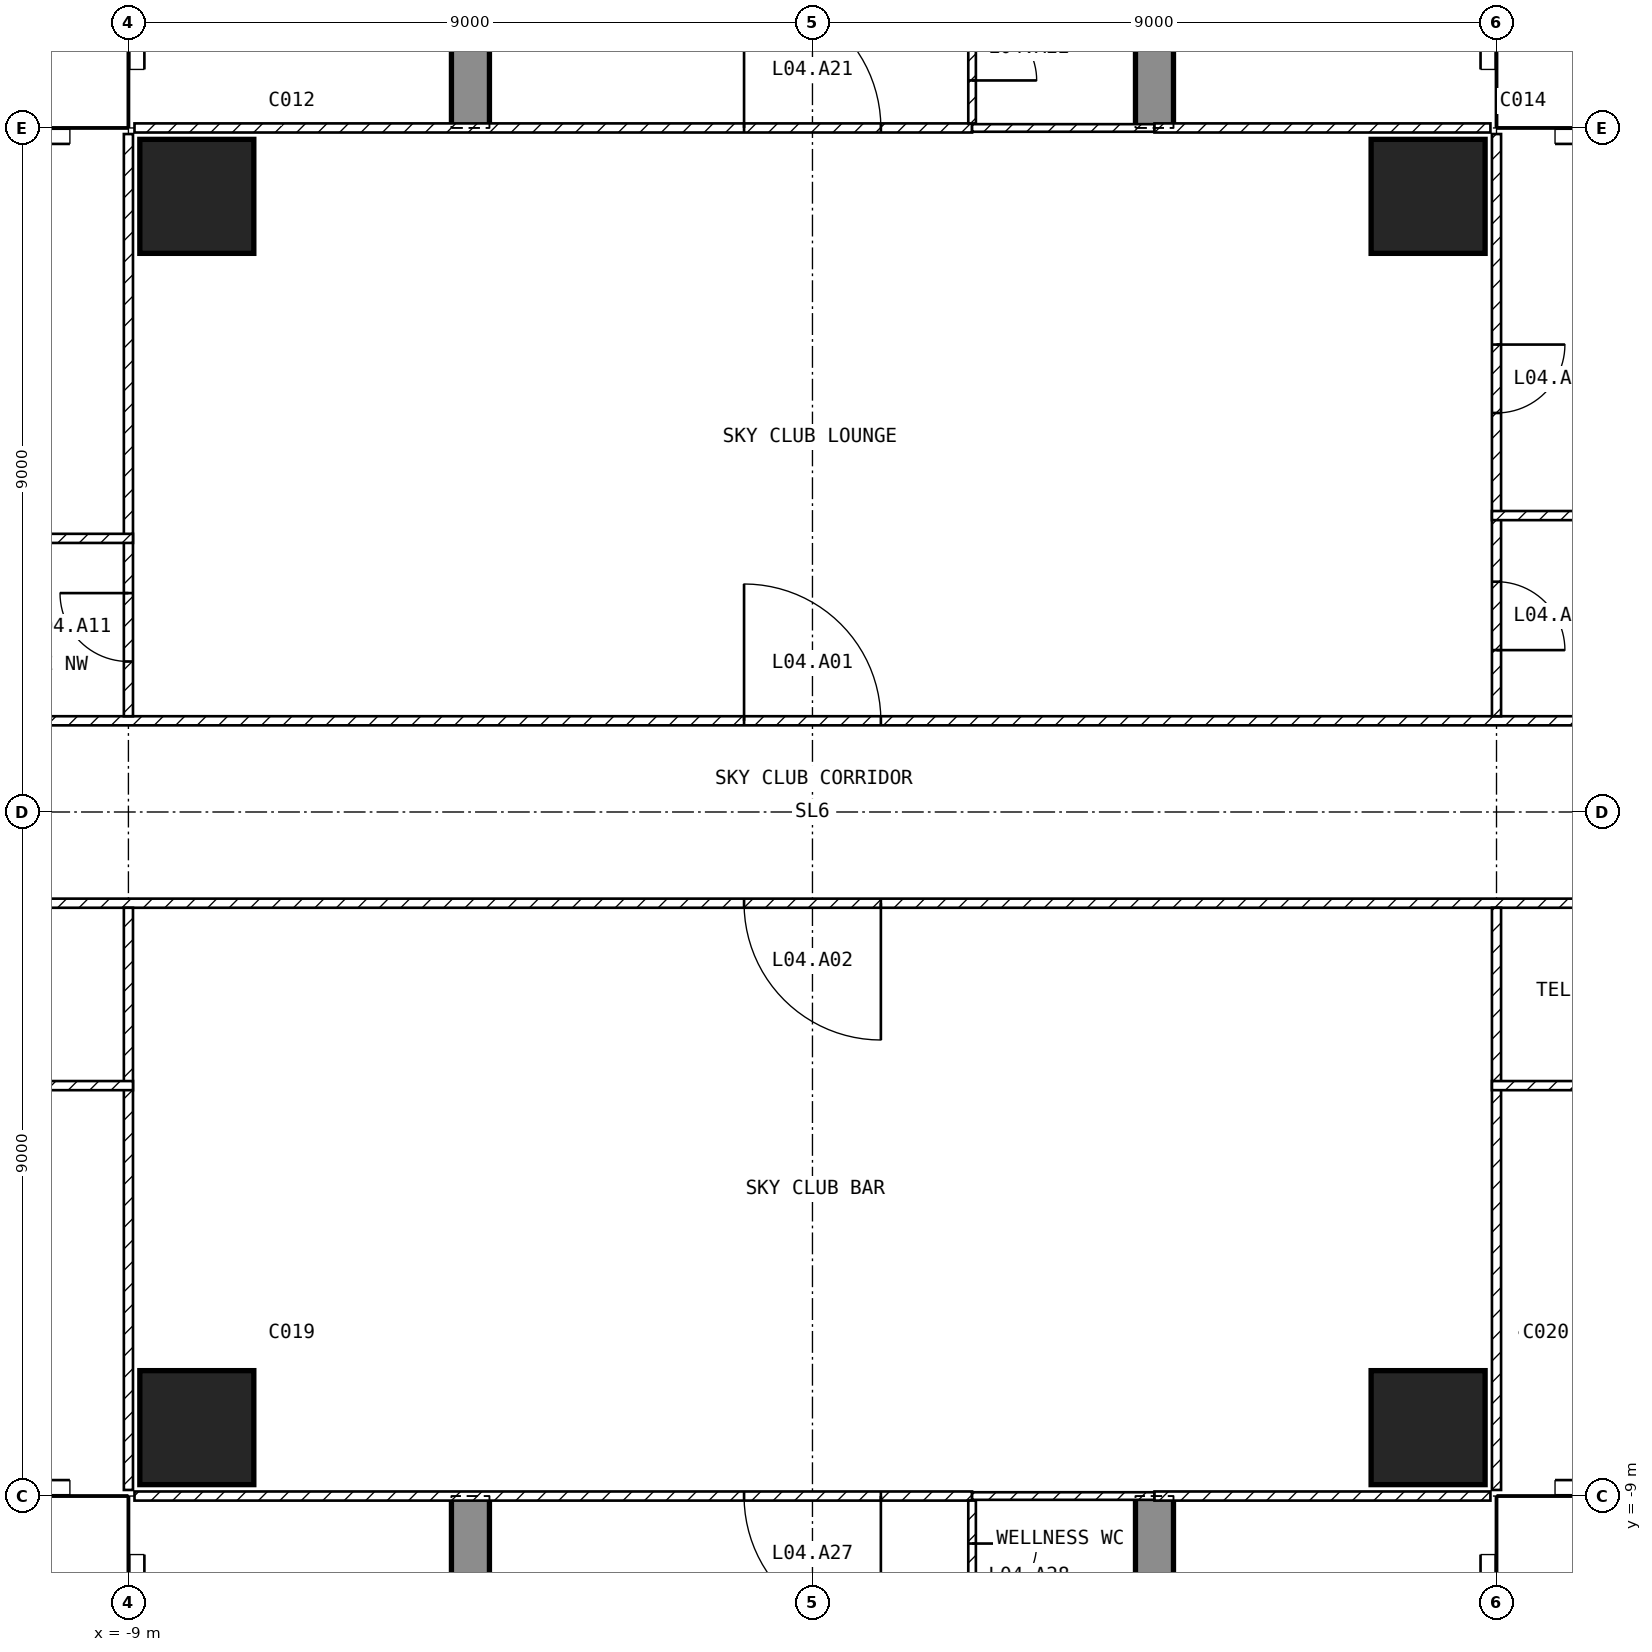
"""IFC4 building model, lengths in metres.
Left out: names, types, materials, properties, quantities, classifications, styles, units other than length and angle.
Written with IfcOpenShell. Run it as: python <this file> out.ifc"""

import sys

from ifc_helpers import new_model, si_unit, direction, frame, frame_2d, origin, origin_2d, place, context, subcontext, project, spatial, polyline, rectangle, outline, extrude, element, fill, save


model = new_model("IFC4")
c1 = context("Model", 3, precision=1e-05, world=origin(), true_north=direction((0.0, 1.0)))
c2 = subcontext(c1, "Body", "Model", "MODEL_VIEW")
j1 = project(units=[si_unit("LENGTHUNIT", "METRE"), si_unit("PLANEANGLEUNIT", "RADIAN")], contexts=[c1])
p1 = place(None, origin())
s1 = spatial("IfcSite", under=j1, at=p1, CompositionType="ELEMENT")
p2 = place(p1, origin())
s2 = spatial("IfcBuilding", under=s1, at=p2, CompositionType="ELEMENT")
p3 = place(p2, frame((0.0, 0.0, 32.0)))
s3 = spatial("IfcBuildingStorey", under=s2, at=p3, CompositionType="ELEMENT", Elevation=32.0)
for number, where, z_axis, x_axis in (
    (1, (-8.1, -8.1, -0.3), (0.0, 0.0, 1.0), (1.0, 0.0, 0.0)),
    (2, (-8.1, 8.1, -0.3), (0.0, 0.0, 1.0), (1.0, 0.0, 0.0)),
    (3, (8.1, -8.1, -0.3), (0.0, 0.0, 1.0), (1.0, 0.0, 0.0)),
    (4, (8.1, 8.1, -0.3), (0.0, 0.0, 1.0), (1.0, 0.0, 0.0)),
):
    element("IfcColumn", number, at=place(p3, frame(where, z_axis=z_axis, x_axis=x_axis)), inside=s3, PredefinedType="COLUMN", context=c2, shape_type="SweptSolid", body=[
        extrude(rectangle(XDim=1.5, YDim=1.5, at=origin_2d()), origin(), (0.0, 0.0, 1.0), 4.55),
    ])
p4 = place(p3, frame((-4.75, -25.35, -0.3), z_axis=(1.0, 0.0, 0.0), x_axis=(0.0, 1.0, 0.0)))
e5 = element("IfcWall", 5, at=p4, inside=s3, PredefinedType="SHEAR", context=c2, shape_type="SweptSolid", body=[
    extrude(outline(polyline([(0.0, 0.0), (4.05, 0.0), (4.05, 2.7), (6.45, 2.7), (6.45, 0.0), (11.85, 0.0), (11.85, 2.7), (14.25, 2.7), (14.25, 0.0), (16.35, 0.0), (16.35, 4.55), (0.0, 4.55), (0.0, 0.0)])), origin(), (0.0, 0.0, 1.0), 0.5),
])
p5 = place(p3, frame((-4.75, 9.0, -0.3), z_axis=(1.0, 0.0, 0.0), x_axis=(0.0, 1.0, 0.0)))
e6 = element("IfcWall", 6, at=p5, inside=s3, PredefinedType="SHEAR", context=c2, shape_type="SweptSolid", body=[
    extrude(outline(polyline([(0.0, 0.0), (2.1, 0.0), (2.1, 2.7), (4.5, 2.7), (4.5, 0.0), (9.9, 0.0), (9.9, 2.7), (12.3, 2.7), (12.3, 0.0), (16.35, 0.0), (16.35, 4.55), (0.0, 4.55), (0.0, 0.0)])), origin(), (0.0, 0.0, 1.0), 0.5),
])
p6 = place(p3, frame((4.25, -25.35, -0.3), z_axis=(1.0, 0.0, 0.0), x_axis=(0.0, 1.0, 0.0)))
e7 = element("IfcWall", 7, at=p6, inside=s3, PredefinedType="SHEAR", context=c2, shape_type="SweptSolid", body=[
    extrude(outline(polyline([(0.0, 0.0), (4.05, 0.0), (4.05, 2.7), (6.45, 2.7), (6.45, 0.0), (11.85, 0.0), (11.85, 2.7), (14.25, 2.7), (14.25, 0.0), (16.35, 0.0), (16.35, 4.55), (0.0, 4.55), (0.0, 0.0)])), origin(), (0.0, 0.0, 1.0), 0.5),
])
p7 = place(p3, frame((4.25, 9.0, -0.3), z_axis=(1.0, 0.0, 0.0), x_axis=(0.0, 1.0, 0.0)))
e8 = element("IfcWall", 8, at=p7, inside=s3, PredefinedType="SHEAR", context=c2, shape_type="SweptSolid", body=[
    extrude(outline(polyline([(0.0, 0.0), (2.1, 0.0), (2.1, 2.7), (4.5, 2.7), (4.5, 0.0), (9.9, 0.0), (9.9, 2.7), (12.3, 2.7), (12.3, 0.0), (16.35, 0.0), (16.35, 4.55), (0.0, 4.55), (0.0, 0.0)])), origin(), (0.0, 0.0, 1.0), 0.5),
])
p8 = place(p3, frame((-12.6, 1.2, 0.0), z_axis=(0.0, 0.0, 1.0), x_axis=(1.0, 0.0, 0.0)))
e9 = element("IfcWall", 9, at=p8, inside=s3, PredefinedType="PARTITIONING", context=c2, shape_type="SweptSolid", body=[
    extrude(rectangle(XDim=30.6, YDim=0.12, at=frame_2d((15.3, 0.0))), origin(), (0.0, 0.0, 1.0), 4.25),
])
p9 = place(p8, frame((11.7, 0.0, 0.0)))
e10 = element("IfcOpeningElement", 10, at=p9, cuts=e9, PredefinedType="OPENING", context=c2, shape_type="SweptSolid", body=[
    extrude(rectangle(XDim=1.8, YDim=2.1, at=frame_2d((0.9, 1.05))), frame((0.0, 0.07, 0.0), z_axis=(0.0, -1.0, 0.0), x_axis=(1.0, 0.0, 0.0)), (0.0, 0.0, 1.0), 0.14),
])
p10 = place(p8, frame((28.35, 0.0, 0.0)))
e11 = element("IfcOpeningElement", 11, at=p10, cuts=e9, PredefinedType="OPENING", context=c2, shape_type="SweptSolid", body=[
    extrude(rectangle(XDim=0.9, YDim=2.1, at=frame_2d((0.45, 1.05))), frame((0.0, 0.07, 0.0), z_axis=(0.0, -1.0, 0.0), x_axis=(1.0, 0.0, 0.0)), (0.0, 0.0, 1.0), 0.14),
])
p11 = place(p3, frame((18.0, -1.2, 0.0), z_axis=(0.0, 0.0, 1.0), x_axis=(-1.0, 0.0, 0.0)))
e12 = element("IfcWall", 12, at=p11, inside=s3, PredefinedType="PARTITIONING", context=c2, shape_type="SweptSolid", body=[
    extrude(rectangle(XDim=36.0, YDim=0.12, at=frame_2d((18.0, 0.0))), origin(), (0.0, 0.0, 1.0), 4.25),
])
p12 = place(p11, frame((17.1, 0.0, 0.0)))
e13 = element("IfcOpeningElement", 13, at=p12, cuts=e12, PredefinedType="OPENING", context=c2, shape_type="SweptSolid", body=[
    extrude(rectangle(XDim=1.8, YDim=2.1, at=frame_2d((0.9, 1.05))), frame((0.0, 0.07, 0.0), z_axis=(0.0, -1.0, 0.0), x_axis=(1.0, 0.0, 0.0)), (0.0, 0.0, 1.0), 0.14),
])
p13 = place(p11, frame((2.25, 0.0, 0.0)))
e14 = element("IfcOpeningElement", 14, at=p13, cuts=e12, PredefinedType="OPENING", context=c2, shape_type="SweptSolid", body=[
    extrude(rectangle(XDim=0.9, YDim=2.1, at=frame_2d((0.45, 1.05))), frame((0.0, 0.07, 0.0), z_axis=(0.0, -1.0, 0.0), x_axis=(1.0, 0.0, 0.0)), (0.0, 0.0, 1.0), 0.14),
])
p14 = place(p11, frame((29.85, 0.0, 0.0)))
e15 = element("IfcOpeningElement", 15, at=p14, cuts=e12, PredefinedType="OPENING", context=c2, shape_type="SweptSolid", body=[
    extrude(rectangle(XDim=0.9, YDim=2.1, at=frame_2d((0.45, 1.05))), frame((0.0, 0.07, 0.0), z_axis=(0.0, -1.0, 0.0), x_axis=(1.0, 0.0, 0.0)), (0.0, 0.0, 1.0), 0.14),
])
p15 = place(p3, frame((9.0, 8.92, 0.0), z_axis=(0.0, 0.0, 1.0), x_axis=(0.0, -1.0, 0.0)))
e16 = element("IfcWall", 16, at=p15, inside=s3, PredefinedType="PARTITIONING", context=c2, shape_type="SweptSolid", body=[
    extrude(rectangle(XDim=7.66, YDim=0.12, at=frame_2d((3.83, 0.0))), origin(), (0.0, 0.0, 1.0), 4.25),
])
p16 = place(p15, frame((2.77, 0.0, 0.0)))
e17 = element("IfcOpeningElement", 17, at=p16, cuts=e16, PredefinedType="OPENING", context=c2, shape_type="SweptSolid", body=[
    extrude(rectangle(XDim=0.9, YDim=2.1, at=frame_2d((0.45, 1.05))), frame((0.0, 0.07, 0.0), z_axis=(0.0, -1.0, 0.0), x_axis=(1.0, 0.0, 0.0)), (0.0, 0.0, 1.0), 0.14),
])
p17 = place(p15, frame((5.89, 0.0, 0.0)))
e18 = element("IfcOpeningElement", 18, at=p17, cuts=e16, PredefinedType="OPENING", context=c2, shape_type="SweptSolid", body=[
    extrude(rectangle(XDim=0.9, YDim=2.1, at=frame_2d((0.45, 1.05))), frame((0.0, 0.07, 0.0), z_axis=(0.0, -1.0, 0.0), x_axis=(1.0, 0.0, 0.0)), (0.0, 0.0, 1.0), 0.14),
])
p18 = place(p3, frame((-9.0, 1.26, 0.0), z_axis=(0.0, 0.0, 1.0), x_axis=(0.0, 1.0, 0.0)))
e19 = element("IfcWall", 19, at=p18, inside=s3, PredefinedType="PARTITIONING", context=c2, shape_type="SweptSolid", body=[
    extrude(rectangle(XDim=7.66, YDim=0.12, at=frame_2d((3.83, 0.0))), origin(), (0.0, 0.0, 1.0), 4.25),
])
p19 = place(p18, frame((0.72, 0.0, 0.0)))
e20 = element("IfcOpeningElement", 20, at=p19, cuts=e19, PredefinedType="OPENING", context=c2, shape_type="SweptSolid", body=[
    extrude(rectangle(XDim=0.9, YDim=2.1, at=frame_2d((0.45, 1.05))), frame((0.0, 0.07, 0.0), z_axis=(0.0, -1.0, 0.0), x_axis=(1.0, 0.0, 0.0)), (0.0, 0.0, 1.0), 0.14),
])
p20 = place(p3, frame((-8.92, 9.0, 0.0), z_axis=(0.0, 0.0, 1.0), x_axis=(1.0, 0.0, 0.0)))
e21 = element("IfcWall", 21, at=p20, inside=s3, PredefinedType="PARTITIONING", context=c2, shape_type="SweptSolid", body=[
    extrude(rectangle(XDim=11.02, YDim=0.12, at=frame_2d((5.51, 0.0))), origin(), (0.0, 0.0, 1.0), 4.25),
])
p21 = place(p20, frame((8.02, 0.0, 0.0)))
e22 = element("IfcOpeningElement", 22, at=p21, cuts=e21, PredefinedType="OPENING", context=c2, shape_type="SweptSolid", body=[
    extrude(rectangle(XDim=1.8, YDim=2.1, at=frame_2d((0.9, 1.05))), frame((0.0, 0.07, 0.0), z_axis=(0.0, -1.0, 0.0), x_axis=(1.0, 0.0, 0.0)), (0.0, 0.0, 1.0), 0.14),
])
p22 = place(p3, frame((2.1, 9.0, 0.0), z_axis=(0.0, 0.0, 1.0), x_axis=(1.0, 0.0, 0.0)))
e23 = element("IfcWall", 23, at=p22, inside=s3, PredefinedType="PARTITIONING", context=c2, shape_type="SweptSolid", body=[
    extrude(rectangle(XDim=2.4, YDim=0.1, at=frame_2d((1.2, 0.0))), origin(), (0.0, 0.0, 1.0), 4.25),
])
p23 = place(p3, frame((4.5, 9.0, 0.0), z_axis=(0.0, 0.0, 1.0), x_axis=(1.0, 0.0, 0.0)))
e24 = element("IfcWall", 24, at=p23, inside=s3, PredefinedType="PARTITIONING", context=c2, shape_type="SweptSolid", body=[
    extrude(rectangle(XDim=4.42, YDim=0.12, at=frame_2d((2.21, 0.0))), origin(), (0.0, 0.0, 1.0), 4.25),
])
for number, where, z_axis, x_axis in (
    (25, (9.0, -1.26, 0.0), (0.0, 0.0, 1.0), (0.0, -1.0, 0.0)),
    (26, (-9.0, -8.92, 0.0), (0.0, 0.0, 1.0), (0.0, 1.0, 0.0)),
):
    element("IfcWall", number, at=place(p3, frame(where, z_axis=z_axis, x_axis=x_axis)), inside=s3, PredefinedType="PARTITIONING", context=c2, shape_type="SweptSolid", body=[
        extrude(rectangle(XDim=7.66, YDim=0.12, at=frame_2d((3.83, 0.0))), origin(), (0.0, 0.0, 1.0), 4.25),
    ])
p24 = place(p3, frame((2.1, -9.0, 0.0), z_axis=(0.0, 0.0, 1.0), x_axis=(-1.0, 0.0, 0.0)))
e27 = element("IfcWall", 27, at=p24, inside=s3, PredefinedType="PARTITIONING", context=c2, shape_type="SweptSolid", body=[
    extrude(rectangle(XDim=11.02, YDim=0.12, at=frame_2d((5.51, 0.0))), origin(), (0.0, 0.0, 1.0), 4.25),
])
p25 = place(p24, frame((1.2, 0.0, 0.0)))
e28 = element("IfcOpeningElement", 28, at=p25, cuts=e27, PredefinedType="OPENING", context=c2, shape_type="SweptSolid", body=[
    extrude(rectangle(XDim=1.8, YDim=2.1, at=frame_2d((0.9, 1.05))), frame((0.0, 0.07, 0.0), z_axis=(0.0, -1.0, 0.0), x_axis=(1.0, 0.0, 0.0)), (0.0, 0.0, 1.0), 0.14),
])
p26 = place(p3, frame((4.5, -9.0, 0.0), z_axis=(0.0, 0.0, 1.0), x_axis=(-1.0, 0.0, 0.0)))
e29 = element("IfcWall", 29, at=p26, inside=s3, PredefinedType="PARTITIONING", context=c2, shape_type="SweptSolid", body=[
    extrude(rectangle(XDim=2.4, YDim=0.1, at=frame_2d((1.2, 0.0))), origin(), (0.0, 0.0, 1.0), 4.25),
])
p27 = place(p3, frame((8.92, -9.0, 0.0), z_axis=(0.0, 0.0, 1.0), x_axis=(-1.0, 0.0, 0.0)))
e30 = element("IfcWall", 30, at=p27, inside=s3, PredefinedType="PARTITIONING", context=c2, shape_type="SweptSolid", body=[
    extrude(rectangle(XDim=4.42, YDim=0.12, at=frame_2d((2.21, 0.0))), origin(), (0.0, 0.0, 1.0), 4.25),
])
p28 = place(p3, frame((18.0, 3.9, 0.0), z_axis=(0.0, 0.0, 1.0), x_axis=(-1.0, 0.0, 0.0)))
e31 = element("IfcWall", 31, at=p28, inside=s3, PredefinedType="PARTITIONING", context=c2, shape_type="SweptSolid", body=[
    extrude(rectangle(XDim=9.06, YDim=0.12, at=frame_2d((4.53, 0.0))), origin(), (0.0, 0.0, 1.0), 4.25),
])
p29 = place(p3, frame((8.94, -3.6, 0.0), z_axis=(0.0, 0.0, 1.0), x_axis=(1.0, 0.0, 0.0)))
e32 = element("IfcWall", 32, at=p29, inside=s3, PredefinedType="PARTITIONING", context=c2, shape_type="SweptSolid", body=[
    extrude(rectangle(XDim=9.06, YDim=0.12, at=frame_2d((4.53, 0.0))), origin(), (0.0, 0.0, 1.0), 4.25),
])
p30 = place(p29, frame((5.91, 0.0, 0.0)))
e33 = element("IfcOpeningElement", 33, at=p30, cuts=e32, PredefinedType="OPENING", context=c2, shape_type="SweptSolid", body=[
    extrude(rectangle(XDim=0.9, YDim=2.1, at=frame_2d((0.45, 1.05))), frame((0.0, 0.07, 0.0), z_axis=(0.0, -1.0, 0.0), x_axis=(1.0, 0.0, 0.0)), (0.0, 0.0, 1.0), 0.14),
])
p31 = place(p3, frame((-8.94, 3.6, 0.0), z_axis=(0.0, 0.0, 1.0), x_axis=(-1.0, 0.0, 0.0)))
e34 = element("IfcWall", 34, at=p31, inside=s3, PredefinedType="PARTITIONING", context=c2, shape_type="SweptSolid", body=[
    extrude(rectangle(XDim=3.66, YDim=0.12, at=frame_2d((1.83, 0.0))), origin(), (0.0, 0.0, 1.0), 4.25),
])
p32 = place(p3, frame((-18.0, -3.6, 0.0), z_axis=(0.0, 0.0, 1.0), x_axis=(1.0, 0.0, 0.0)))
e35 = element("IfcWall", 35, at=p32, inside=s3, PredefinedType="PARTITIONING", context=c2, shape_type="SweptSolid", body=[
    extrude(rectangle(XDim=9.06, YDim=0.12, at=frame_2d((4.53, 0.0))), origin(), (0.0, 0.0, 1.0), 4.25),
])
p33 = place(p32, frame((5.25, 0.0, 0.0)))
e36 = element("IfcOpeningElement", 36, at=p33, cuts=e35, PredefinedType="OPENING", context=c2, shape_type="SweptSolid", body=[
    extrude(rectangle(XDim=0.9, YDim=2.1, at=frame_2d((0.45, 1.05))), frame((0.0, 0.07, 0.0), z_axis=(0.0, -1.0, 0.0), x_axis=(1.0, 0.0, 0.0)), (0.0, 0.0, 1.0), 0.14),
])
p34 = place(p3, frame((2.1, 11.04, 0.0), z_axis=(0.0, 0.0, 1.0), x_axis=(0.0, -1.0, 0.0)))
e37 = element("IfcWall", 37, at=p34, inside=s3, PredefinedType="PARTITIONING", context=c2, shape_type="SweptSolid", body=[
    extrude(rectangle(XDim=1.98, YDim=0.1, at=frame_2d((0.99, 0.0))), origin(), (0.0, 0.0, 1.0), 4.25),
])
p35 = place(p34, frame((0.565, 0.0, 0.0)))
e38 = element("IfcOpeningElement", 38, at=p35, cuts=e37, PredefinedType="OPENING", context=c2, shape_type="SweptSolid", body=[
    extrude(rectangle(XDim=0.85, YDim=2.1, at=frame_2d((0.425, 1.05))), frame((0.0, 0.06, 0.0), z_axis=(0.0, -1.0, 0.0), x_axis=(1.0, 0.0, 0.0)), (0.0, 0.0, 1.0), 0.12),
])
p36 = place(p3, frame((2.1, -9.06, 0.0), z_axis=(0.0, 0.0, 1.0), x_axis=(0.0, -1.0, 0.0)))
e39 = element("IfcWall", 39, at=p36, inside=s3, PredefinedType="PARTITIONING", context=c2, shape_type="SweptSolid", body=[
    extrude(rectangle(XDim=1.98, YDim=0.1, at=frame_2d((0.99, 0.0))), origin(), (0.0, 0.0, 1.0), 4.25),
])
p37 = place(p36, frame((0.565, 0.0, 0.0)))
e40 = element("IfcOpeningElement", 40, at=p37, cuts=e39, PredefinedType="OPENING", context=c2, shape_type="SweptSolid", body=[
    extrude(rectangle(XDim=0.85, YDim=2.1, at=frame_2d((0.425, 1.05))), frame((0.0, 0.06, 0.0), z_axis=(0.0, -1.0, 0.0), x_axis=(1.0, 0.0, 0.0)), (0.0, 0.0, 1.0), 0.12),
])
p38 = place(p9, origin())
e41 = element("IfcDoor", 41, at=p38, inside=s3, OperationType="SINGLE_SWING_LEFT", PredefinedType="DOOR", context=c2, shape_type="SweptSolid", body=[
    extrude(rectangle(XDim=1.8, YDim=2.1, at=frame_2d((0.9, 1.05))), frame((0.0, 0.025, 0.0), z_axis=(0.0, -1.0, 0.0), x_axis=(1.0, 0.0, 0.0)), (0.0, 0.0, 1.0), 0.05),
])
fill(e10, e41)
p39 = place(p12, origin())
e42 = element("IfcDoor", 42, at=p39, inside=s3, OperationType="SINGLE_SWING_LEFT", PredefinedType="DOOR", context=c2, shape_type="SweptSolid", body=[
    extrude(rectangle(XDim=1.8, YDim=2.1, at=frame_2d((0.9, 1.05))), frame((0.0, 0.025, 0.0), z_axis=(0.0, -1.0, 0.0), x_axis=(1.0, 0.0, 0.0)), (0.0, 0.0, 1.0), 0.05),
])
fill(e13, e42)
p40 = place(p19, origin())
e43 = element("IfcDoor", 43, at=p40, inside=s3, OperationType="SINGLE_SWING_RIGHT", PredefinedType="DOOR", context=c2, shape_type="SweptSolid", body=[
    extrude(rectangle(XDim=0.9, YDim=2.1, at=frame_2d((0.45, 1.05))), frame((0.0, 0.025, 0.0), z_axis=(0.0, -1.0, 0.0), x_axis=(1.0, 0.0, 0.0)), (0.0, 0.0, 1.0), 0.05),
])
fill(e20, e43)
p41 = place(p16, origin())
e44 = element("IfcDoor", 44, at=p41, inside=s3, OperationType="SINGLE_SWING_LEFT", PredefinedType="DOOR", context=c2, shape_type="SweptSolid", body=[
    extrude(rectangle(XDim=0.9, YDim=2.1, at=frame_2d((0.45, 1.05))), frame((0.0, 0.025, 0.0), z_axis=(0.0, -1.0, 0.0), x_axis=(1.0, 0.0, 0.0)), (0.0, 0.0, 1.0), 0.05),
])
fill(e17, e44)
p42 = place(p17, origin())
e45 = element("IfcDoor", 45, at=p42, inside=s3, OperationType="SINGLE_SWING_RIGHT", PredefinedType="DOOR", context=c2, shape_type="SweptSolid", body=[
    extrude(rectangle(XDim=0.9, YDim=2.1, at=frame_2d((0.45, 1.05))), frame((0.0, 0.025, 0.0), z_axis=(0.0, -1.0, 0.0), x_axis=(1.0, 0.0, 0.0)), (0.0, 0.0, 1.0), 0.05),
])
fill(e18, e45)
p43 = place(p21, origin())
e46 = element("IfcDoor", 46, at=p43, inside=s3, OperationType="SINGLE_SWING_LEFT", PredefinedType="DOOR", context=c2, shape_type="SweptSolid", body=[
    extrude(rectangle(XDim=1.8, YDim=2.1, at=frame_2d((0.9, 1.05))), frame((0.0, 0.025, 0.0), z_axis=(0.0, -1.0, 0.0), x_axis=(1.0, 0.0, 0.0)), (0.0, 0.0, 1.0), 0.05),
])
fill(e22, e46)
p44 = place(p35, origin())
e47 = element("IfcDoor", 47, at=p44, inside=s3, OperationType="SINGLE_SWING_RIGHT", PredefinedType="DOOR", context=c2, shape_type="SweptSolid", body=[
    extrude(rectangle(XDim=0.85, YDim=2.1, at=frame_2d((0.425, 1.05))), frame((0.0, 0.025, 0.0), z_axis=(0.0, -1.0, 0.0), x_axis=(1.0, 0.0, 0.0)), (0.0, 0.0, 1.0), 0.05),
])
fill(e38, e47)
p45 = place(p25, origin())
e48 = element("IfcDoor", 48, at=p45, inside=s3, OperationType="SINGLE_SWING_LEFT", PredefinedType="DOOR", context=c2, shape_type="SweptSolid", body=[
    extrude(rectangle(XDim=1.8, YDim=2.1, at=frame_2d((0.9, 1.05))), frame((0.0, 0.025, 0.0), z_axis=(0.0, -1.0, 0.0), x_axis=(1.0, 0.0, 0.0)), (0.0, 0.0, 1.0), 0.05),
])
fill(e28, e48)
p46 = place(p37, origin())
e49 = element("IfcDoor", 49, at=p46, inside=s3, OperationType="SINGLE_SWING_LEFT", PredefinedType="DOOR", context=c2, shape_type="SweptSolid", body=[
    extrude(rectangle(XDim=0.85, YDim=2.1, at=frame_2d((0.425, 1.05))), frame((0.0, 0.025, 0.0), z_axis=(0.0, -1.0, 0.0), x_axis=(1.0, 0.0, 0.0)), (0.0, 0.0, 1.0), 0.05),
])
fill(e40, e49)
save(model, sys.argv[1])
